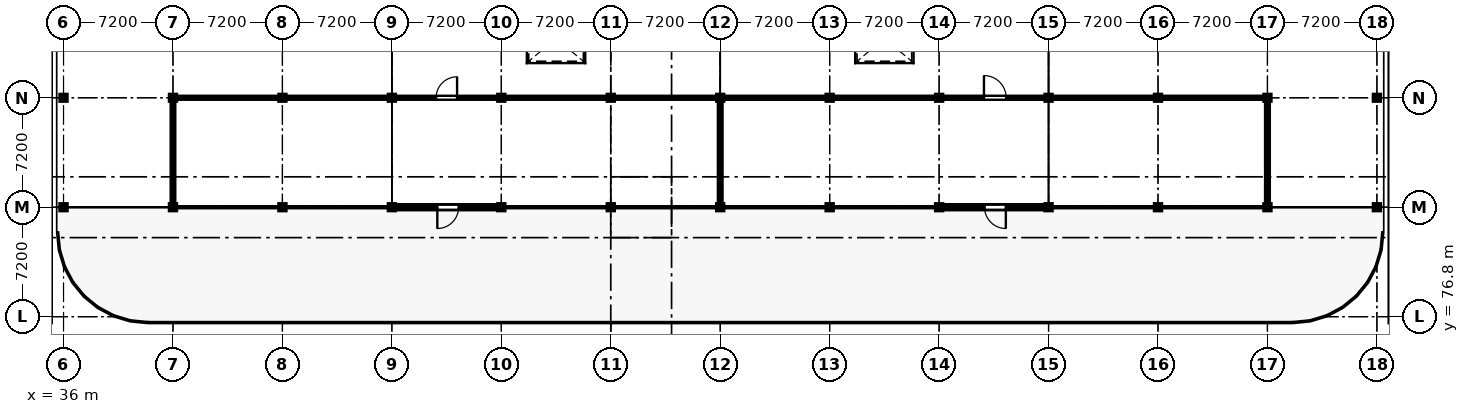
"""IFC4 building model, lengths in metres.
Left out: names, types, materials, properties, quantities, classifications, styles, units other than length and angle.
Written with IfcOpenShell. Run it as: python <this file> out.ifc"""

import sys

from ifc_helpers import new_model, si_unit, direction, frame, frame_2d, origin, origin_2d, place, context, subcontext, project, spatial, rectangle, i_section, extrude, element, fill, save


model = new_model("IFC4")
c1 = context("Model", 3, precision=1e-05, world=origin(), true_north=direction((0.0, 1.0)))
c2 = subcontext(c1, "Body", "Model", "MODEL_VIEW")
j1 = project(units=[si_unit("LENGTHUNIT", "METRE"), si_unit("PLANEANGLEUNIT", "RADIAN")], contexts=[c1])
p1 = place(None, origin())
s1 = spatial("IfcSite", under=j1, at=p1, CompositionType="ELEMENT")
p2 = place(p1, origin())
s2 = spatial("IfcBuilding", under=s1, at=p2, CompositionType="ELEMENT")
p3 = place(p2, frame((0.0, 0.0, 17.1)))
s3 = spatial("IfcBuildingStorey", under=s2, at=p3, CompositionType="ELEMENT", Elevation=17.1)
p4 = place(p3, frame((36.0, 84.0, 0.0), z_axis=(0.0, 0.0, 1.0), x_axis=(1.0, 0.0, 0.0)))
e1 = element("IfcColumn", 1, at=p4, inside=s3, PredefinedType="COLUMN", context=c2, shape_type="SweptSolid", body=[
    extrude(i_section(OverallWidth=0.371, OverallDepth=0.363, WebThickness=0.013, FlangeThickness=0.022, FilletRadius=0.015, at=origin_2d()), origin(), (0.0, 0.0, 1.0), 3.9),
])
p5 = place(p3, frame((36.0, 91.2, 0.0), z_axis=(0.0, 0.0, 1.0), x_axis=(1.0, 0.0, 0.0)))
e2 = element("IfcColumn", 2, at=p5, inside=s3, PredefinedType="COLUMN", context=c2, shape_type="SweptSolid", body=[
    extrude(i_section(OverallWidth=0.368, OverallDepth=0.356, WebThickness=0.011, FlangeThickness=0.018, FilletRadius=0.015, at=origin_2d()), origin(), (0.0, 0.0, 1.0), 3.9),
])
p6 = place(p3, frame((43.2, 84.0, 0.0), z_axis=(0.0, 0.0, 1.0), x_axis=(1.0, 0.0, 0.0)))
e3 = element("IfcColumn", 3, at=p6, inside=s3, PredefinedType="COLUMN", context=c2, shape_type="SweptSolid", body=[
    extrude(i_section(OverallWidth=0.371, OverallDepth=0.363, WebThickness=0.013, FlangeThickness=0.022, FilletRadius=0.015, at=origin_2d()), origin(), (0.0, 0.0, 1.0), 3.9),
])
p7 = place(p3, frame((43.2, 91.2, 0.0), z_axis=(0.0, 0.0, 1.0), x_axis=(1.0, 0.0, 0.0)))
e4 = element("IfcColumn", 4, at=p7, inside=s3, PredefinedType="COLUMN", context=c2, shape_type="SweptSolid", body=[
    extrude(i_section(OverallWidth=0.368, OverallDepth=0.356, WebThickness=0.011, FlangeThickness=0.018, FilletRadius=0.015, at=origin_2d()), origin(), (0.0, 0.0, 1.0), 3.9),
])
p8 = place(p3, frame((50.4, 84.0, 0.0), z_axis=(0.0, 0.0, 1.0), x_axis=(1.0, 0.0, 0.0)))
e5 = element("IfcColumn", 5, at=p8, inside=s3, PredefinedType="COLUMN", context=c2, shape_type="SweptSolid", body=[
    extrude(i_section(OverallWidth=0.371, OverallDepth=0.363, WebThickness=0.013, FlangeThickness=0.022, FilletRadius=0.015, at=origin_2d()), origin(), (0.0, 0.0, 1.0), 3.9),
])
p9 = place(p3, frame((50.4, 91.2, 0.0), z_axis=(0.0, 0.0, 1.0), x_axis=(1.0, 0.0, 0.0)))
e6 = element("IfcColumn", 6, at=p9, inside=s3, PredefinedType="COLUMN", context=c2, shape_type="SweptSolid", body=[
    extrude(i_section(OverallWidth=0.368, OverallDepth=0.356, WebThickness=0.011, FlangeThickness=0.018, FilletRadius=0.015, at=origin_2d()), origin(), (0.0, 0.0, 1.0), 3.9),
])
p10 = place(p3, frame((57.6, 84.0, 0.0), z_axis=(0.0, 0.0, 1.0), x_axis=(1.0, 0.0, 0.0)))
e7 = element("IfcColumn", 7, at=p10, inside=s3, PredefinedType="COLUMN", context=c2, shape_type="SweptSolid", body=[
    extrude(i_section(OverallWidth=0.371, OverallDepth=0.363, WebThickness=0.013, FlangeThickness=0.022, FilletRadius=0.015, at=origin_2d()), origin(), (0.0, 0.0, 1.0), 3.9),
])
p11 = place(p3, frame((57.6, 91.2, 0.0), z_axis=(0.0, 0.0, 1.0), x_axis=(1.0, 0.0, 0.0)))
e8 = element("IfcColumn", 8, at=p11, inside=s3, PredefinedType="COLUMN", context=c2, shape_type="SweptSolid", body=[
    extrude(i_section(OverallWidth=0.368, OverallDepth=0.356, WebThickness=0.011, FlangeThickness=0.018, FilletRadius=0.015, at=origin_2d()), origin(), (0.0, 0.0, 1.0), 3.9),
])
p12 = place(p3, frame((64.8, 84.0, 0.0), z_axis=(0.0, 0.0, 1.0), x_axis=(1.0, 0.0, 0.0)))
e9 = element("IfcColumn", 9, at=p12, inside=s3, PredefinedType="COLUMN", context=c2, shape_type="SweptSolid", body=[
    extrude(i_section(OverallWidth=0.371, OverallDepth=0.363, WebThickness=0.013, FlangeThickness=0.022, FilletRadius=0.015, at=origin_2d()), origin(), (0.0, 0.0, 1.0), 3.9),
])
p13 = place(p3, frame((64.8, 91.2, 0.0), z_axis=(0.0, 0.0, 1.0), x_axis=(1.0, 0.0, 0.0)))
e10 = element("IfcColumn", 10, at=p13, inside=s3, PredefinedType="COLUMN", context=c2, shape_type="SweptSolid", body=[
    extrude(i_section(OverallWidth=0.368, OverallDepth=0.356, WebThickness=0.011, FlangeThickness=0.018, FilletRadius=0.015, at=origin_2d()), origin(), (0.0, 0.0, 1.0), 3.9),
])
p14 = place(p3, frame((72.0, 84.0, 0.0), z_axis=(0.0, 0.0, 1.0), x_axis=(1.0, 0.0, 0.0)))
e11 = element("IfcColumn", 11, at=p14, inside=s3, PredefinedType="COLUMN", context=c2, shape_type="SweptSolid", body=[
    extrude(i_section(OverallWidth=0.371, OverallDepth=0.363, WebThickness=0.013, FlangeThickness=0.022, FilletRadius=0.015, at=origin_2d()), origin(), (0.0, 0.0, 1.0), 3.9),
])
p15 = place(p3, frame((72.0, 91.2, 0.0), z_axis=(0.0, 0.0, 1.0), x_axis=(1.0, 0.0, 0.0)))
e12 = element("IfcColumn", 12, at=p15, inside=s3, PredefinedType="COLUMN", context=c2, shape_type="SweptSolid", body=[
    extrude(i_section(OverallWidth=0.368, OverallDepth=0.356, WebThickness=0.011, FlangeThickness=0.018, FilletRadius=0.015, at=origin_2d()), origin(), (0.0, 0.0, 1.0), 3.9),
])
p16 = place(p3, frame((79.2, 84.0, 0.0), z_axis=(0.0, 0.0, 1.0), x_axis=(1.0, 0.0, 0.0)))
e13 = element("IfcColumn", 13, at=p16, inside=s3, PredefinedType="COLUMN", context=c2, shape_type="SweptSolid", body=[
    extrude(i_section(OverallWidth=0.371, OverallDepth=0.363, WebThickness=0.013, FlangeThickness=0.022, FilletRadius=0.015, at=origin_2d()), origin(), (0.0, 0.0, 1.0), 3.9),
])
p17 = place(p3, frame((79.2, 91.2, 0.0), z_axis=(0.0, 0.0, 1.0), x_axis=(1.0, 0.0, 0.0)))
e14 = element("IfcColumn", 14, at=p17, inside=s3, PredefinedType="COLUMN", context=c2, shape_type="SweptSolid", body=[
    extrude(i_section(OverallWidth=0.368, OverallDepth=0.356, WebThickness=0.011, FlangeThickness=0.018, FilletRadius=0.015, at=origin_2d()), origin(), (0.0, 0.0, 1.0), 3.9),
])
p18 = place(p3, frame((86.4, 84.0, 0.0), z_axis=(0.0, 0.0, 1.0), x_axis=(1.0, 0.0, 0.0)))
e15 = element("IfcColumn", 15, at=p18, inside=s3, PredefinedType="COLUMN", context=c2, shape_type="SweptSolid", body=[
    extrude(i_section(OverallWidth=0.371, OverallDepth=0.363, WebThickness=0.013, FlangeThickness=0.022, FilletRadius=0.015, at=origin_2d()), origin(), (0.0, 0.0, 1.0), 3.9),
])
p19 = place(p3, frame((86.4, 91.2, 0.0), z_axis=(0.0, 0.0, 1.0), x_axis=(1.0, 0.0, 0.0)))
e16 = element("IfcColumn", 16, at=p19, inside=s3, PredefinedType="COLUMN", context=c2, shape_type="SweptSolid", body=[
    extrude(i_section(OverallWidth=0.368, OverallDepth=0.356, WebThickness=0.011, FlangeThickness=0.018, FilletRadius=0.015, at=origin_2d()), origin(), (0.0, 0.0, 1.0), 3.9),
])
p20 = place(p3, frame((93.6, 84.0, 0.0), z_axis=(0.0, 0.0, 1.0), x_axis=(1.0, 0.0, 0.0)))
e17 = element("IfcColumn", 17, at=p20, inside=s3, PredefinedType="COLUMN", context=c2, shape_type="SweptSolid", body=[
    extrude(i_section(OverallWidth=0.371, OverallDepth=0.363, WebThickness=0.013, FlangeThickness=0.022, FilletRadius=0.015, at=origin_2d()), origin(), (0.0, 0.0, 1.0), 3.9),
])
p21 = place(p3, frame((93.6, 91.2, 0.0), z_axis=(0.0, 0.0, 1.0), x_axis=(1.0, 0.0, 0.0)))
e18 = element("IfcColumn", 18, at=p21, inside=s3, PredefinedType="COLUMN", context=c2, shape_type="SweptSolid", body=[
    extrude(i_section(OverallWidth=0.368, OverallDepth=0.356, WebThickness=0.011, FlangeThickness=0.018, FilletRadius=0.015, at=origin_2d()), origin(), (0.0, 0.0, 1.0), 3.9),
])
p22 = place(p3, frame((100.8, 84.0, 0.0), z_axis=(0.0, 0.0, 1.0), x_axis=(1.0, 0.0, 0.0)))
e19 = element("IfcColumn", 19, at=p22, inside=s3, PredefinedType="COLUMN", context=c2, shape_type="SweptSolid", body=[
    extrude(i_section(OverallWidth=0.371, OverallDepth=0.363, WebThickness=0.013, FlangeThickness=0.022, FilletRadius=0.015, at=origin_2d()), origin(), (0.0, 0.0, 1.0), 3.9),
])
p23 = place(p3, frame((100.8, 91.2, 0.0), z_axis=(0.0, 0.0, 1.0), x_axis=(1.0, 0.0, 0.0)))
e20 = element("IfcColumn", 20, at=p23, inside=s3, PredefinedType="COLUMN", context=c2, shape_type="SweptSolid", body=[
    extrude(i_section(OverallWidth=0.368, OverallDepth=0.356, WebThickness=0.011, FlangeThickness=0.018, FilletRadius=0.015, at=origin_2d()), origin(), (0.0, 0.0, 1.0), 3.9),
])
p24 = place(p3, frame((108.0, 84.0, 0.0), z_axis=(0.0, 0.0, 1.0), x_axis=(1.0, 0.0, 0.0)))
e21 = element("IfcColumn", 21, at=p24, inside=s3, PredefinedType="COLUMN", context=c2, shape_type="SweptSolid", body=[
    extrude(i_section(OverallWidth=0.371, OverallDepth=0.363, WebThickness=0.013, FlangeThickness=0.022, FilletRadius=0.015, at=origin_2d()), origin(), (0.0, 0.0, 1.0), 3.9),
])
p25 = place(p3, frame((108.0, 91.2, 0.0), z_axis=(0.0, 0.0, 1.0), x_axis=(1.0, 0.0, 0.0)))
e22 = element("IfcColumn", 22, at=p25, inside=s3, PredefinedType="COLUMN", context=c2, shape_type="SweptSolid", body=[
    extrude(i_section(OverallWidth=0.368, OverallDepth=0.356, WebThickness=0.011, FlangeThickness=0.018, FilletRadius=0.015, at=origin_2d()), origin(), (0.0, 0.0, 1.0), 3.9),
])
p26 = place(p3, frame((115.2, 84.0, 0.0), z_axis=(0.0, 0.0, 1.0), x_axis=(1.0, 0.0, 0.0)))
e23 = element("IfcColumn", 23, at=p26, inside=s3, PredefinedType="COLUMN", context=c2, shape_type="SweptSolid", body=[
    extrude(i_section(OverallWidth=0.371, OverallDepth=0.363, WebThickness=0.013, FlangeThickness=0.022, FilletRadius=0.015, at=origin_2d()), origin(), (0.0, 0.0, 1.0), 3.9),
])
p27 = place(p3, frame((115.2, 91.2, 0.0), z_axis=(0.0, 0.0, 1.0), x_axis=(1.0, 0.0, 0.0)))
e24 = element("IfcColumn", 24, at=p27, inside=s3, PredefinedType="COLUMN", context=c2, shape_type="SweptSolid", body=[
    extrude(i_section(OverallWidth=0.368, OverallDepth=0.356, WebThickness=0.011, FlangeThickness=0.018, FilletRadius=0.015, at=origin_2d()), origin(), (0.0, 0.0, 1.0), 3.9),
])
p28 = place(p3, frame((122.4, 84.0, 0.0), z_axis=(0.0, 0.0, 1.0), x_axis=(1.0, 0.0, 0.0)))
e25 = element("IfcColumn", 25, at=p28, inside=s3, PredefinedType="COLUMN", context=c2, shape_type="SweptSolid", body=[
    extrude(i_section(OverallWidth=0.371, OverallDepth=0.363, WebThickness=0.013, FlangeThickness=0.022, FilletRadius=0.015, at=origin_2d()), origin(), (0.0, 0.0, 1.0), 3.9),
])
p29 = place(p3, frame((122.4, 91.2, 0.0), z_axis=(0.0, 0.0, 1.0), x_axis=(1.0, 0.0, 0.0)))
e26 = element("IfcColumn", 26, at=p29, inside=s3, PredefinedType="COLUMN", context=c2, shape_type="SweptSolid", body=[
    extrude(i_section(OverallWidth=0.368, OverallDepth=0.356, WebThickness=0.011, FlangeThickness=0.018, FilletRadius=0.015, at=origin_2d()), origin(), (0.0, 0.0, 1.0), 3.9),
])
p30 = place(p3, frame((64.608, 84.0, 0.0), z_axis=(0.0, 0.0, 1.0), x_axis=(-1.0, 0.0, 0.0)))
e27 = element("IfcWall", 27, at=p30, inside=s3, PredefinedType="STANDARD", context=c2, shape_type="SweptSolid", body=[
    extrude(rectangle(XDim=6.816, YDim=0.24, at=frame_2d((3.408, 0.0))), origin(), (0.0, 0.0, 1.0), 2.868),
])
p31 = place(p30, frame((2.618, 0.0, 0.0)))
e28 = element("IfcOpeningElement", 28, at=p31, cuts=e27, PredefinedType="OPENING", context=c2, shape_type="SweptSolid", body=[
    extrude(rectangle(XDim=1.4, YDim=2.15, at=frame_2d((0.7, 1.075))), frame((0.0, 0.13, 0.0), z_axis=(0.0, -1.0, 0.0), x_axis=(1.0, 0.0, 0.0)), (0.0, 0.0, 1.0), 0.26),
])
p32 = place(p3, frame((100.608, 84.0, 0.0), z_axis=(0.0, 0.0, 1.0), x_axis=(-1.0, 0.0, 0.0)))
e29 = element("IfcWall", 29, at=p32, inside=s3, PredefinedType="STANDARD", context=c2, shape_type="SweptSolid", body=[
    extrude(rectangle(XDim=6.816, YDim=0.24, at=frame_2d((3.408, 0.0))), origin(), (0.0, 0.0, 1.0), 2.868),
])
p33 = place(p32, frame((2.618, 0.0, 0.0)))
e30 = element("IfcOpeningElement", 30, at=p33, cuts=e29, PredefinedType="OPENING", context=c2, shape_type="SweptSolid", body=[
    extrude(rectangle(XDim=1.4, YDim=2.15, at=frame_2d((0.7, 1.075))), frame((0.0, 0.13, 0.0), z_axis=(0.0, -1.0, 0.0), x_axis=(1.0, 0.0, 0.0)), (0.0, 0.0, 1.0), 0.26),
])
p34 = place(p3, frame((43.12, 91.2, 0.0), z_axis=(0.0, 0.0, 1.0), x_axis=(1.0, 0.0, 0.0)))
e31 = element("IfcWall", 31, at=p34, inside=s3, PredefinedType="PARTITIONING", context=c2, shape_type="SweptSolid", body=[
    extrude(rectangle(XDim=36.16, YDim=0.105, at=frame_2d((18.08, 0.0))), origin(), (0.0, 0.0, 1.0), 2.863),
])
p35 = place(p34, frame((17.39, 0.0, 0.0)))
e32 = element("IfcOpeningElement", 32, at=p35, cuts=e31, PredefinedType="OPENING", context=c2, shape_type="SweptSolid", body=[
    extrude(rectangle(XDim=1.38, YDim=2.1, at=frame_2d((0.69, 1.05))), frame((0.0, 0.062, 0.0), z_axis=(0.0, -1.0, 0.0), x_axis=(1.0, 0.0, 0.0)), (0.0, 0.0, 1.0), 0.125),
])
p36 = place(p34, frame((20.02, 0.0, 0.95)))
e33 = element("IfcOpeningElement", 33, at=p36, cuts=e31, PredefinedType="OPENING", context=c2, shape_type="SweptSolid", body=[
    extrude(rectangle(XDim=1.0, YDim=1.15, at=frame_2d((0.5, 0.575))), frame((0.0, 0.062, 0.0), z_axis=(0.0, -1.0, 0.0), x_axis=(1.0, 0.0, 0.0)), (0.0, 0.0, 1.0), 0.125),
])
p37 = place(p3, frame((79.282, 91.2, 0.0), z_axis=(0.0, 0.0, 1.0), x_axis=(1.0, 0.0, 0.0)))
e34 = element("IfcWall", 34, at=p37, inside=s3, PredefinedType="PARTITIONING", context=c2, shape_type="SweptSolid", body=[
    extrude(rectangle(XDim=35.998, YDim=0.11, at=frame_2d((17.999, 0.0))), origin(), (0.0, 0.0, 1.0), 2.863),
])
p38 = place(p37, frame((17.269, 0.0, 0.0)))
e35 = element("IfcOpeningElement", 35, at=p38, cuts=e34, PredefinedType="OPENING", context=c2, shape_type="SweptSolid", body=[
    extrude(rectangle(XDim=1.46, YDim=2.1, at=frame_2d((0.73, 1.05))), frame((0.0, 0.065, 0.0), z_axis=(0.0, -1.0, 0.0), x_axis=(1.0, 0.0, 0.0)), (0.0, 0.0, 1.0), 0.13),
])
p39 = place(p37, frame((22.229, 0.0, 0.95)))
e36 = element("IfcOpeningElement", 36, at=p39, cuts=e34, PredefinedType="OPENING", context=c2, shape_type="SweptSolid", body=[
    extrude(rectangle(XDim=1.25, YDim=1.15, at=frame_2d((0.625, 0.575))), frame((0.0, 0.065, 0.0), z_axis=(0.0, -1.0, 0.0), x_axis=(1.0, 0.0, 0.0)), (0.0, 0.0, 1.0), 0.13),
])
p40 = place(p3, frame((43.2, 84.122, 0.0), z_axis=(0.0, 0.0, 1.0), x_axis=(0.0, 1.0, 0.0)))
e37 = element("IfcWall", 37, at=p40, inside=s3, PredefinedType="PARTITIONING", context=c2, shape_type="SweptSolid", body=[
    extrude(rectangle(XDim=7.024, YDim=0.145, at=frame_2d((3.512, 0.0))), origin(), (0.0, 0.0, 1.0), 2.863),
])
p41 = place(p3, frame((79.2, 91.143, 0.0), z_axis=(0.0, 0.0, 1.0), x_axis=(0.0, -1.0, 0.0)))
e38 = element("IfcWall", 38, at=p41, inside=s3, PredefinedType="PARTITIONING", context=c2, shape_type="SweptSolid", body=[
    extrude(rectangle(XDim=7.021, YDim=0.15, at=frame_2d((3.51, 0.0))), origin(), (0.0, 0.0, 1.0), 2.863),
])
p42 = place(p3, frame((115.2, 91.143, 0.0), z_axis=(0.0, 0.0, 1.0), x_axis=(0.0, -1.0, 0.0)))
e39 = element("IfcWall", 39, at=p42, inside=s3, PredefinedType="PARTITIONING", context=c2, shape_type="SweptSolid", body=[
    extrude(rectangle(XDim=7.021, YDim=0.155, at=frame_2d((3.51, 0.0))), origin(), (0.0, 0.0, 1.0), 2.863),
])
p43 = place(p31, origin())
e40 = element("IfcDoor", 40, at=p43, inside=s3, OperationType="SINGLE_SWING_RIGHT", PredefinedType="DOOR", context=c2, shape_type="SweptSolid", body=[
    extrude(rectangle(XDim=1.4, YDim=2.15, at=frame_2d((0.7, 1.075))), frame((0.0, 0.025, 0.0), z_axis=(0.0, -1.0, 0.0), x_axis=(1.0, 0.0, 0.0)), (0.0, 0.0, 1.0), 0.05),
])
fill(e28, e40)
p44 = place(p33, origin())
e41 = element("IfcDoor", 41, at=p44, inside=s3, OperationType="SINGLE_SWING_LEFT", PredefinedType="DOOR", context=c2, shape_type="SweptSolid", body=[
    extrude(rectangle(XDim=1.4, YDim=2.15, at=frame_2d((0.7, 1.075))), frame((0.0, 0.025, 0.0), z_axis=(0.0, -1.0, 0.0), x_axis=(1.0, 0.0, 0.0)), (0.0, 0.0, 1.0), 0.05),
])
fill(e30, e41)
p45 = place(p35, origin())
e42 = element("IfcDoor", 42, at=p45, inside=s3, OperationType="SINGLE_SWING_RIGHT", PredefinedType="DOOR", context=c2, shape_type="SweptSolid", body=[
    extrude(rectangle(XDim=1.38, YDim=2.1, at=frame_2d((0.69, 1.05))), frame((0.0, 0.025, 0.0), z_axis=(0.0, -1.0, 0.0), x_axis=(1.0, 0.0, 0.0)), (0.0, 0.0, 1.0), 0.05),
])
fill(e32, e42)
p46 = place(p36, origin())
e43 = element("IfcWindow", 43, at=p46, inside=s3, PartitioningType="SINGLE_PANEL", PredefinedType="WINDOW", context=c2, shape_type="SweptSolid", body=[
    extrude(rectangle(XDim=1.0, YDim=1.15, at=frame_2d((0.5, 0.575))), frame((0.0, 0.03, 0.0), z_axis=(0.0, -1.0, 0.0), x_axis=(1.0, 0.0, 0.0)), (0.0, 0.0, 1.0), 0.06),
])
fill(e33, e43)
p47 = place(p38, origin())
e44 = element("IfcDoor", 44, at=p47, inside=s3, OperationType="SINGLE_SWING_LEFT", PredefinedType="DOOR", context=c2, shape_type="SweptSolid", body=[
    extrude(rectangle(XDim=1.46, YDim=2.1, at=frame_2d((0.73, 1.05))), frame((0.0, 0.025, 0.0), z_axis=(0.0, -1.0, 0.0), x_axis=(1.0, 0.0, 0.0)), (0.0, 0.0, 1.0), 0.05),
])
fill(e35, e44)
p48 = place(p39, origin())
e45 = element("IfcWindow", 45, at=p48, inside=s3, PartitioningType="SINGLE_PANEL", PredefinedType="WINDOW", context=c2, shape_type="SweptSolid", body=[
    extrude(rectangle(XDim=1.25, YDim=1.15, at=frame_2d((0.625, 0.575))), frame((0.0, 0.03, 0.0), z_axis=(0.0, -1.0, 0.0), x_axis=(1.0, 0.0, 0.0)), (0.0, 0.0, 1.0), 0.06),
])
fill(e36, e45)
save(model, sys.argv[1])
